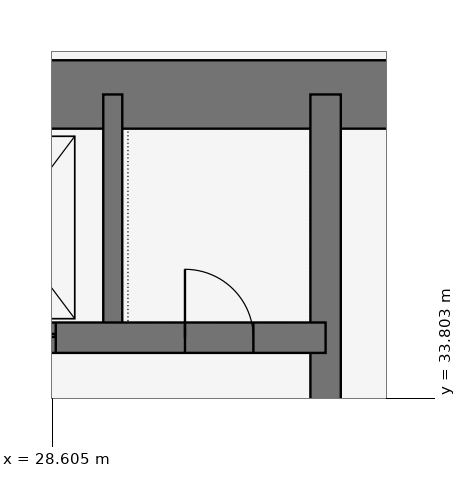
"""IFC4 building model, lengths in metres.
Left out: names, types, materials, properties, quantities, classifications, styles, units other than length and angle.
Written with IfcOpenShell. Run it as: python <this file> out.ifc"""

import sys

from ifc_helpers import new_model, si_unit, direction, frame, frame_2d, origin, place, context, subcontext, project, spatial, rectangle, extrude, element, fill, save


model = new_model("IFC4")
c1 = context("Model", 3, precision=1e-05, world=origin(), true_north=direction((0.0, 1.0)))
c2 = subcontext(c1, "Body", "Model", "MODEL_VIEW")
j1 = project(units=[si_unit("LENGTHUNIT", "METRE"), si_unit("PLANEANGLEUNIT", "RADIAN")], contexts=[c1])
p1 = place(None, origin())
s1 = spatial("IfcSite", under=j1, at=p1, CompositionType="ELEMENT")
p2 = place(p1, origin())
s2 = spatial("IfcBuilding", under=s1, at=p2, CompositionType="ELEMENT")
p3 = place(p2, frame((0.0, 0.0, 148.5)))
s3 = spatial("IfcBuildingStorey", under=s2, at=p3, CompositionType="ELEMENT", Elevation=148.5)
p4 = place(p3, frame((37.8, 37.8, 0.0), z_axis=(0.0, 0.0, 1.0), x_axis=(-1.0, 0.0, 0.0)))
e1 = element("IfcWall", 1, at=p4, inside=s3, PredefinedType="SHEAR", context=c2, shape_type="SweptSolid", body=[
    extrude(rectangle(XDim=17.25, YDim=0.9, at=frame_2d((8.625, 0.0))), origin(), (0.0, 0.0, 1.0), 3.6),
])
p5 = place(p3, frame((21.0, 34.6, 0.0), z_axis=(0.0, 0.0, 1.0), x_axis=(1.0, 0.0, 0.0)))
e2 = element("IfcWall", 2, at=p5, inside=s3, PredefinedType="SHEAR", context=c2, shape_type="SweptSolid", body=[
    extrude(rectangle(XDim=11.2, YDim=0.4, at=frame_2d((5.6, 0.0))), origin(), (0.0, 0.0, 1.0), 3.6),
])
p6 = place(p5, frame((9.35, 0.0, 0.0)))
e3 = element("IfcOpeningElement", 3, at=p6, cuts=e2, PredefinedType="OPENING", context=c2, shape_type="SweptSolid", body=[
    extrude(rectangle(XDim=0.9, YDim=2.1, at=frame_2d((0.45, 1.05))), frame((0.0, 0.21, 0.0), z_axis=(0.0, -1.0, 0.0), x_axis=(1.0, 0.0, 0.0)), (0.0, 0.0, 1.0), 0.42),
])
p7 = place(p5, frame((1.0, 0.0, 0.0)))
e4 = element("IfcOpeningElement", 4, at=p7, cuts=e2, PredefinedType="OPENING", context=c2, shape_type="SweptSolid", body=[
    extrude(rectangle(XDim=1.1, YDim=2.1, at=frame_2d((0.55, 1.05))), frame((0.0, 0.21, 0.0), z_axis=(0.0, -1.0, 0.0), x_axis=(1.0, 0.0, 0.0)), (0.0, 0.0, 1.0), 0.42),
])
p8 = place(p5, frame((3.65, 0.0, 0.0)))
e5 = element("IfcOpeningElement", 5, at=p8, cuts=e2, PredefinedType="OPENING", context=c2, shape_type="SweptSolid", body=[
    extrude(rectangle(XDim=1.1, YDim=2.1, at=frame_2d((0.55, 1.05))), frame((0.0, 0.21, 0.0), z_axis=(0.0, -1.0, 0.0), x_axis=(1.0, 0.0, 0.0)), (0.0, 0.0, 1.0), 0.42),
])
p9 = place(p5, frame((6.35, 0.0, 0.0)))
e6 = element("IfcOpeningElement", 6, at=p9, cuts=e2, PredefinedType="OPENING", context=c2, shape_type="SweptSolid", body=[
    extrude(rectangle(XDim=1.3, YDim=2.1, at=frame_2d((0.65, 1.05))), frame((0.0, 0.21, 0.0), z_axis=(0.0, -1.0, 0.0), x_axis=(1.0, 0.0, 0.0)), (0.0, 0.0, 1.0), 0.42),
])
p10 = place(p3, frame((32.2, 29.2, 0.0), z_axis=(0.0, 0.0, 1.0), x_axis=(0.0, 1.0, 0.0)))
e7 = element("IfcWall", 7, at=p10, inside=s3, PredefinedType="SHEAR", context=c2, shape_type="SweptSolid", body=[
    extrude(rectangle(XDim=8.6, YDim=0.4, at=frame_2d((4.3, 0.0))), origin(), (0.0, 0.0, 1.0), 3.6),
])
p11 = place(p3, frame((29.4, 34.6, 0.0), z_axis=(0.0, 0.0, 1.0), x_axis=(0.0, 1.0, 0.0)))
e8 = element("IfcWall", 8, at=p11, inside=s3, PredefinedType="SHEAR", context=c2, shape_type="SweptSolid", body=[
    extrude(rectangle(XDim=3.2, YDim=0.25, at=frame_2d((1.6, 0.0))), origin(), (0.0, 0.0, 1.0), 3.6),
])
p12 = place(p6, origin())
e9 = element("IfcDoor", 9, at=p12, inside=s3, OperationType="SINGLE_SWING_LEFT", PredefinedType="DOOR", context=c2, shape_type="SweptSolid", body=[
    extrude(rectangle(XDim=0.9, YDim=2.1, at=frame_2d((0.45, 1.05))), frame((0.0, 0.025, 0.0), z_axis=(0.0, -1.0, 0.0), x_axis=(1.0, 0.0, 0.0)), (0.0, 0.0, 1.0), 0.05),
])
fill(e3, e9)
p13 = place(p9, origin())
e10 = element("IfcDoor", 10, at=p13, inside=s3, OperationType="DOUBLE_DOOR_SLIDING", PredefinedType="DOOR", context=c2, shape_type="SweptSolid", body=[
    extrude(rectangle(XDim=1.3, YDim=2.1, at=frame_2d((0.65, 1.05))), frame((0.0, 0.025, 0.0), z_axis=(0.0, -1.0, 0.0), x_axis=(1.0, 0.0, 0.0)), (0.0, 0.0, 1.0), 0.05),
])
fill(e6, e10)
save(model, sys.argv[1])
